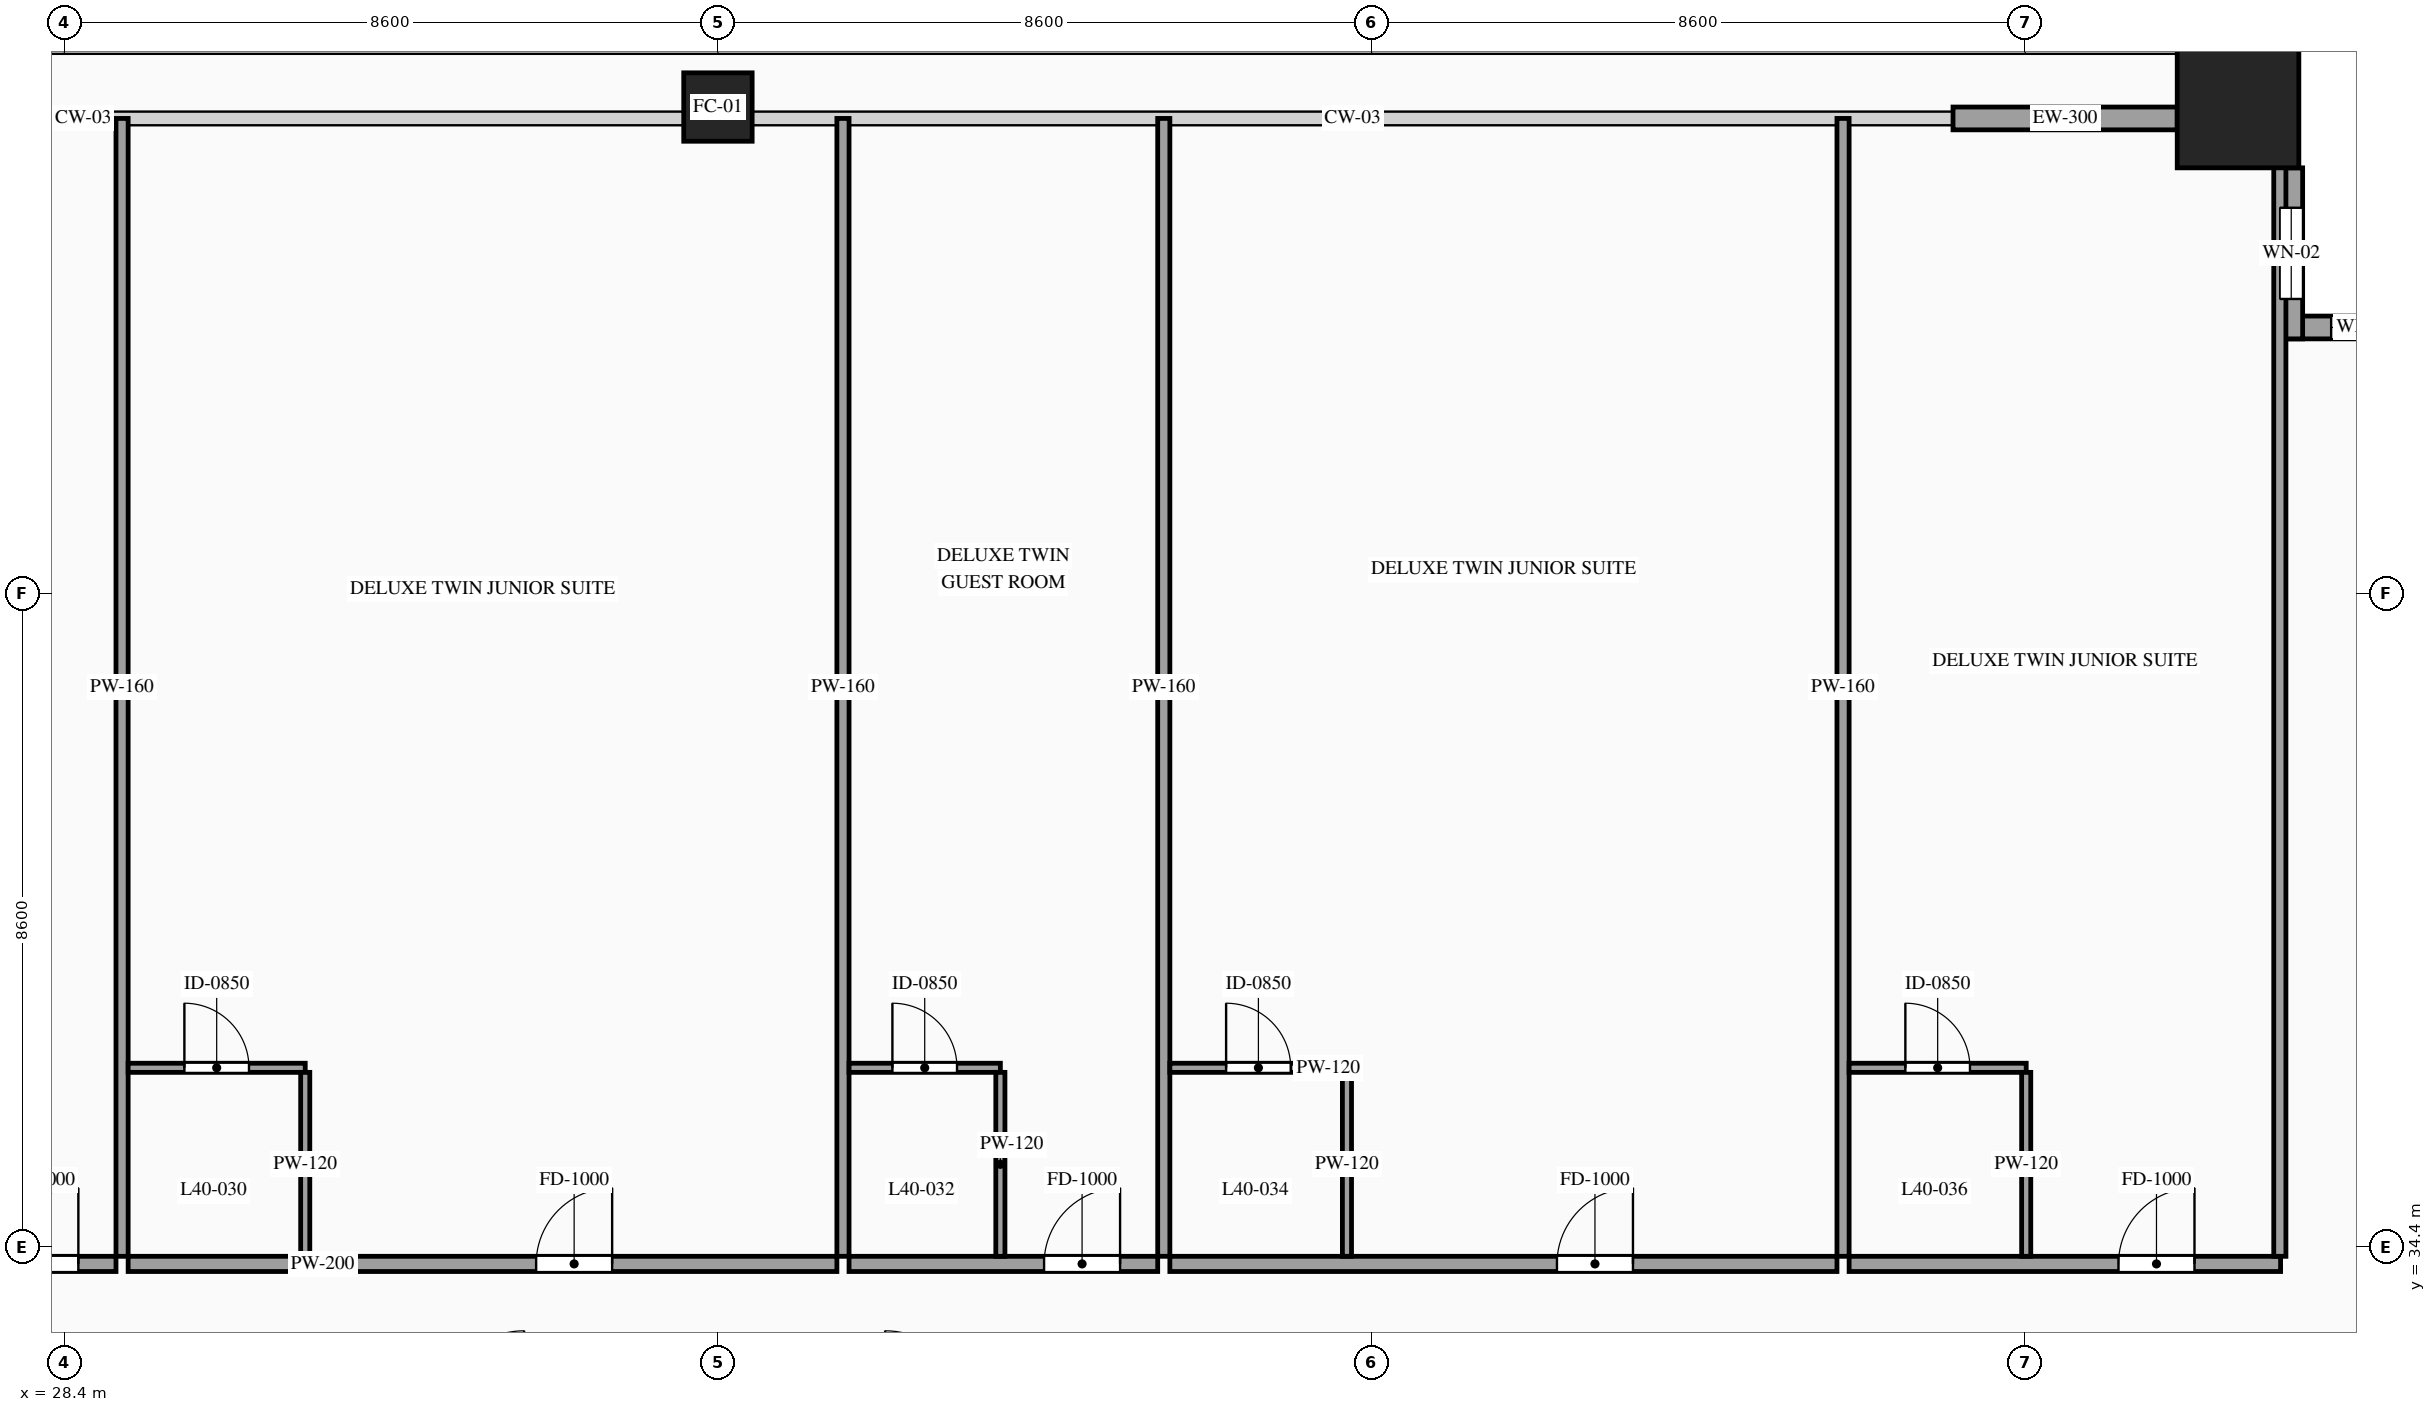
"""IFC4 building model, lengths in metres.
Left out: names, types, materials, properties, quantities, classifications, styles, units other than length and angle.
Written with IfcOpenShell. Run it as: python <this file> out.ifc"""

import sys

from ifc_helpers import new_model, si_unit, direction, frame, frame_2d, origin, origin_2d, place, context, subcontext, project, spatial, rectangle, hollow_rectangle, extrude, source, transform, mapped, element, fill, save


model = new_model("IFC4")
c1 = context("Model", 3, precision=1e-05, world=origin(), true_north=direction((0.0, 1.0)))
c2 = subcontext(c1, "Body", "Model", "MODEL_VIEW")
j1 = project(units=[si_unit("LENGTHUNIT", "METRE"), si_unit("PLANEANGLEUNIT", "RADIAN")], contexts=[c1])
p1 = place(None, origin())
s1 = spatial("IfcSite", under=j1, at=p1, CompositionType="ELEMENT")
p2 = place(p1, origin())
s2 = spatial("IfcBuilding", under=s1, at=p2, CompositionType="ELEMENT")
p3 = place(p2, frame((0.0, 0.0, 152.4)))
s3 = spatial("IfcBuildingStorey", under=s2, at=p3, CompositionType="ELEMENT", Elevation=152.4)
m1 = source(origin(), c2, "Body", "SweptSolid", [
    extrude(hollow_rectangle(XDim=0.9, YDim=0.9, WallThickness=0.042, at=origin_2d()), origin(), (0.0, 0.0, 1.0), 3.6),
])
p4 = place(p3, frame((37.0, 49.4, 0.0), z_axis=(0.0, 0.0, 1.0), x_axis=(1.0, 0.0, 0.0)))
e1 = element("IfcColumn", 1, at=p4, inside=s3, PredefinedType="COLUMN", context=c2, shape_type="MappedRepresentation", body=[
    mapped(m1, transform((0.0, 0.0, 0.0), scale=1.0)),
])
m2 = source(origin(), c2, "Body", "SweptSolid", [
    extrude(hollow_rectangle(XDim=1.6, YDim=1.6, WallThickness=0.07, at=origin_2d()), origin(), (0.0, 0.0, 1.0), 3.6),
])
p5 = place(p3, frame((57.0, 49.4, 0.0), z_axis=(0.0, 0.0, 1.0), x_axis=(1.0, 0.0, 0.0)))
e2 = element("IfcColumn", 2, at=p5, inside=s3, PredefinedType="COLUMN", context=c2, shape_type="MappedRepresentation", body=[
    mapped(m2, transform((0.0, 0.0, 0.0), scale=1.0)),
])
p6 = place(p3, frame((59.8, 46.5, 0.0), z_axis=(0.0, 0.0, 1.0), x_axis=(-1.0, 0.0, 0.0)))
e3 = element("IfcWall", 3, at=p6, inside=s3, PredefinedType="SOLIDWALL", context=c2, shape_type="SweptSolid", body=[
    extrude(rectangle(XDim=2.25, YDim=0.3, at=frame_2d((1.125, 0.0))), origin(), (0.0, 0.0, 1.0), 3.38),
])
p7 = place(p6, frame((0.675, 0.0, 0.85)))
e4 = element("IfcOpeningElement", 4, at=p7, cuts=e3, PredefinedType="OPENING", context=c2, shape_type="SweptSolid", body=[
    extrude(rectangle(XDim=0.9, YDim=1.5, at=frame_2d((0.45, 0.75))), frame((0.0, 0.165, 0.0), z_axis=(0.0, -1.0, 0.0), x_axis=(1.0, 0.0, 0.0)), (0.0, 0.0, 1.0), 0.33),
])
p8 = place(p3, frame((57.7, 46.35, 0.0), z_axis=(0.0, 0.0, 1.0), x_axis=(0.0, 1.0, 0.0)))
e5 = element("IfcWall", 5, at=p8, inside=s3, PredefinedType="SOLIDWALL", context=c2, shape_type="SweptSolid", body=[
    extrude(rectangle(XDim=2.25, YDim=0.3, at=frame_2d((1.125, 0.0))), origin(), (0.0, 0.0, 1.0), 3.38),
])
p9 = place(p8, frame((0.525, 0.0, 0.85)))
e6 = element("IfcOpeningElement", 6, at=p9, cuts=e5, PredefinedType="OPENING", context=c2, shape_type="SweptSolid", body=[
    extrude(rectangle(XDim=1.2, YDim=2.1, at=frame_2d((0.6, 1.05))), frame((0.0, 0.165, 0.0), z_axis=(0.0, -1.0, 0.0), x_axis=(1.0, 0.0, 0.0)), (0.0, 0.0, 1.0), 0.33),
])
m3 = source(origin(), c2, "Body", "SweptSolid", [
    extrude(rectangle(XDim=2.95, YDim=0.3, at=frame_2d((1.475, 0.0))), origin(), (0.0, 0.0, 1.0), 2.775),
])
p10 = place(p3, frame((53.25, 49.25, 0.0), z_axis=(0.0, 0.0, 1.0), x_axis=(1.0, 0.0, 0.0)))
e7 = element("IfcWall", 7, at=p10, inside=s3, PredefinedType="SOLIDWALL", context=c2, shape_type="MappedRepresentation", body=[
    mapped(m3, transform((0.0, 0.0, 0.0), scale=1.0)),
])
p11 = place(p3, frame((25.018, 34.18, 0.0), z_axis=(0.0, 0.0, 1.0), x_axis=(1.0, 0.0, 0.0)))
e8 = element("IfcWall", 8, at=p11, inside=s3, PredefinedType="PARTITIONING", context=c2, shape_type="SweptSolid", body=[
    extrude(rectangle(XDim=4.062, YDim=0.2, at=frame_2d((2.031, 0.0))), origin(), (0.0, 0.0, 1.0), 3.38),
])
p12 = place(p11, frame((2.567, 0.0, 0.0)))
e9 = element("IfcOpeningElement", 9, at=p12, cuts=e8, PredefinedType="OPENING", context=c2, shape_type="SweptSolid", body=[
    extrude(rectangle(XDim=1.0, YDim=2.2, at=frame_2d((0.5, 1.1))), frame((0.0, 0.115, 0.0), z_axis=(0.0, -1.0, 0.0), x_axis=(1.0, 0.0, 0.0)), (0.0, 0.0, 1.0), 0.23),
])
m4 = source(origin(), c2, "Body", "SweptSolid", [
    extrude(rectangle(XDim=14.97, YDim=0.16, at=frame_2d((7.485, 0.0))), origin(), (0.0, 0.0, 1.0), 3.38),
])
p13 = place(p3, frame((29.16, 34.28, 0.0), z_axis=(0.0, 0.0, 1.0), x_axis=(0.0, 1.0, 0.0)))
e10 = element("IfcWall", 10, at=p13, inside=s3, PredefinedType="PARTITIONING", context=c2, shape_type="MappedRepresentation", body=[
    mapped(m4, transform((0.0, 0.0, 0.0), scale=1.0)),
])
p14 = place(p3, frame((29.24, 34.18, 0.0), z_axis=(0.0, 0.0, 1.0), x_axis=(1.0, 0.0, 0.0)))
e11 = element("IfcWall", 11, at=p14, inside=s3, PredefinedType="PARTITIONING", context=c2, shape_type="SweptSolid", body=[
    extrude(rectangle(XDim=9.325, YDim=0.2, at=frame_2d((4.663, 0.0))), origin(), (0.0, 0.0, 1.0), 3.38),
])
p15 = place(p14, frame((5.368, 0.0, 0.0)))
e12 = element("IfcOpeningElement", 12, at=p15, cuts=e11, PredefinedType="OPENING", context=c2, shape_type="SweptSolid", body=[
    extrude(rectangle(XDim=1.0, YDim=2.2, at=frame_2d((0.5, 1.1))), frame((0.0, 0.115, 0.0), z_axis=(0.0, -1.0, 0.0), x_axis=(1.0, 0.0, 0.0)), (0.0, 0.0, 1.0), 0.23),
])
p16 = place(p3, frame((38.645, 34.28, 0.0), z_axis=(0.0, 0.0, 1.0), x_axis=(0.0, 1.0, 0.0)))
e13 = element("IfcWall", 13, at=p16, inside=s3, PredefinedType="PARTITIONING", context=c2, shape_type="MappedRepresentation", body=[
    mapped(m4, transform((0.0, 0.0, 0.0), scale=1.0)),
])
p17 = place(p3, frame((29.24, 36.76, 0.0), z_axis=(0.0, 0.0, 1.0), x_axis=(1.0, 0.0, 0.0)))
e14 = element("IfcWall", 14, at=p17, inside=s3, PredefinedType="PARTITIONING", context=c2, shape_type="SweptSolid", body=[
    extrude(rectangle(XDim=2.33, YDim=0.12, at=frame_2d((1.165, 0.0))), origin(), (0.0, 0.0, 1.0), 3.38),
])
p18 = place(p17, frame((0.74, 0.0, 0.0)))
e15 = element("IfcOpeningElement", 15, at=p18, cuts=e14, PredefinedType="OPENING", context=c2, shape_type="SweptSolid", body=[
    extrude(rectangle(XDim=0.85, YDim=2.1, at=frame_2d((0.425, 1.05))), frame((0.0, 0.075, 0.0), z_axis=(0.0, -1.0, 0.0), x_axis=(1.0, 0.0, 0.0)), (0.0, 0.0, 1.0), 0.15),
])
m5 = source(origin(), c2, "Body", "SweptSolid", [
    extrude(rectangle(XDim=2.42, YDim=0.12, at=frame_2d((1.21, 0.0))), origin(), (0.0, 0.0, 1.0), 3.38),
])
p19 = place(p3, frame((31.57, 34.28, 0.0), z_axis=(0.0, 0.0, 1.0), x_axis=(0.0, 1.0, 0.0)))
e16 = element("IfcWall", 16, at=p19, inside=s3, PredefinedType="PARTITIONING", context=c2, shape_type="MappedRepresentation", body=[
    mapped(m5, transform((0.0, 0.0, 0.0), scale=1.0)),
])
p20 = place(p3, frame((38.725, 34.18, 0.0), z_axis=(0.0, 0.0, 1.0), x_axis=(1.0, 0.0, 0.0)))
e17 = element("IfcWall", 17, at=p20, inside=s3, PredefinedType="PARTITIONING", context=c2, shape_type="SweptSolid", body=[
    extrude(rectangle(XDim=4.061, YDim=0.2, at=frame_2d((2.03, 0.0))), origin(), (0.0, 0.0, 1.0), 3.38),
])
p21 = place(p20, frame((2.566, 0.0, 0.0)))
e18 = element("IfcOpeningElement", 18, at=p21, cuts=e17, PredefinedType="OPENING", context=c2, shape_type="SweptSolid", body=[
    extrude(rectangle(XDim=1.0, YDim=2.2, at=frame_2d((0.5, 1.1))), frame((0.0, 0.115, 0.0), z_axis=(0.0, -1.0, 0.0), x_axis=(1.0, 0.0, 0.0)), (0.0, 0.0, 1.0), 0.23),
])
p22 = place(p3, frame((42.866, 34.28, 0.0), z_axis=(0.0, 0.0, 1.0), x_axis=(0.0, 1.0, 0.0)))
e19 = element("IfcWall", 19, at=p22, inside=s3, PredefinedType="PARTITIONING", context=c2, shape_type="MappedRepresentation", body=[
    mapped(m4, transform((0.0, 0.0, 0.0), scale=1.0)),
])
p23 = place(p3, frame((38.725, 36.76, 0.0), z_axis=(0.0, 0.0, 1.0), x_axis=(1.0, 0.0, 0.0)))
e20 = element("IfcWall", 20, at=p23, inside=s3, PredefinedType="PARTITIONING", context=c2, shape_type="SweptSolid", body=[
    extrude(rectangle(XDim=1.991, YDim=0.12, at=frame_2d((0.996, 0.0))), origin(), (0.0, 0.0, 1.0), 3.38),
])
p24 = place(p23, frame((0.571, 0.0, 0.0)))
e21 = element("IfcOpeningElement", 21, at=p24, cuts=e20, PredefinedType="OPENING", context=c2, shape_type="SweptSolid", body=[
    extrude(rectangle(XDim=0.85, YDim=2.1, at=frame_2d((0.425, 1.05))), frame((0.0, 0.075, 0.0), z_axis=(0.0, -1.0, 0.0), x_axis=(1.0, 0.0, 0.0)), (0.0, 0.0, 1.0), 0.15),
])
p25 = place(p3, frame((40.716, 34.28, 0.0), z_axis=(0.0, 0.0, 1.0), x_axis=(0.0, 1.0, 0.0)))
e22 = element("IfcWall", 22, at=p25, inside=s3, PredefinedType="PARTITIONING", context=c2, shape_type="MappedRepresentation", body=[
    mapped(m5, transform((0.0, 0.0, 0.0), scale=1.0)),
])
p26 = place(p3, frame((42.946, 34.18, 0.0), z_axis=(0.0, 0.0, 1.0), x_axis=(1.0, 0.0, 0.0)))
e23 = element("IfcWall", 23, at=p26, inside=s3, PredefinedType="PARTITIONING", context=c2, shape_type="SweptSolid", body=[
    extrude(rectangle(XDim=8.777, YDim=0.2, at=frame_2d((4.388, 0.0))), origin(), (0.0, 0.0, 1.0), 3.38),
])
p27 = place(p26, frame((5.093, 0.0, 0.0)))
e24 = element("IfcOpeningElement", 24, at=p27, cuts=e23, PredefinedType="OPENING", context=c2, shape_type="SweptSolid", body=[
    extrude(rectangle(XDim=1.0, YDim=2.2, at=frame_2d((0.5, 1.1))), frame((0.0, 0.115, 0.0), z_axis=(0.0, -1.0, 0.0), x_axis=(1.0, 0.0, 0.0)), (0.0, 0.0, 1.0), 0.23),
])
p28 = place(p3, frame((51.803, 34.28, 0.0), z_axis=(0.0, 0.0, 1.0), x_axis=(0.0, 1.0, 0.0)))
e25 = element("IfcWall", 25, at=p28, inside=s3, PredefinedType="PARTITIONING", context=c2, shape_type="MappedRepresentation", body=[
    mapped(m4, transform((0.0, 0.0, 0.0), scale=1.0)),
])
p29 = place(p3, frame((42.946, 36.76, 0.0), z_axis=(0.0, 0.0, 1.0), x_axis=(1.0, 0.0, 0.0)))
e26 = element("IfcWall", 26, at=p29, inside=s3, PredefinedType="PARTITIONING", context=c2, shape_type="SweptSolid", body=[
    extrude(rectangle(XDim=2.33, YDim=0.12, at=frame_2d((1.165, 0.0))), origin(), (0.0, 0.0, 1.0), 3.38),
])
p30 = place(p29, frame((0.74, 0.0, 0.0)))
e27 = element("IfcOpeningElement", 27, at=p30, cuts=e26, PredefinedType="OPENING", context=c2, shape_type="SweptSolid", body=[
    extrude(rectangle(XDim=0.85, YDim=2.1, at=frame_2d((0.425, 1.05))), frame((0.0, 0.075, 0.0), z_axis=(0.0, -1.0, 0.0), x_axis=(1.0, 0.0, 0.0)), (0.0, 0.0, 1.0), 0.15),
])
p31 = place(p3, frame((45.276, 34.28, 0.0), z_axis=(0.0, 0.0, 1.0), x_axis=(0.0, 1.0, 0.0)))
e28 = element("IfcWall", 28, at=p31, inside=s3, PredefinedType="PARTITIONING", context=c2, shape_type="MappedRepresentation", body=[
    mapped(m5, transform((0.0, 0.0, 0.0), scale=1.0)),
])
p32 = place(p3, frame((51.883, 34.18, 0.0), z_axis=(0.0, 0.0, 1.0), x_axis=(1.0, 0.0, 0.0)))
e29 = element("IfcWall", 29, at=p32, inside=s3, PredefinedType="PARTITIONING", context=c2, shape_type="SweptSolid", body=[
    extrude(rectangle(XDim=5.677, YDim=0.2, at=frame_2d((2.838, 0.0))), origin(), (0.0, 0.0, 1.0), 3.38),
])
p33 = place(p32, frame((3.544, 0.0, 0.0)))
e30 = element("IfcOpeningElement", 30, at=p33, cuts=e29, PredefinedType="OPENING", context=c2, shape_type="SweptSolid", body=[
    extrude(rectangle(XDim=1.0, YDim=2.2, at=frame_2d((0.5, 1.1))), frame((0.0, 0.115, 0.0), z_axis=(0.0, -1.0, 0.0), x_axis=(1.0, 0.0, 0.0)), (0.0, 0.0, 1.0), 0.23),
])
m6 = source(origin(), c2, "Body", "SweptSolid", [
    extrude(rectangle(XDim=14.82, YDim=0.16, at=frame_2d((7.41, 0.0))), origin(), (0.0, 0.0, 1.0), 3.38),
])
p34 = place(p3, frame((57.55, 34.28, 0.0), z_axis=(0.0, 0.0, 1.0), x_axis=(0.0, 1.0, 0.0)))
e31 = element("IfcWall", 31, at=p34, inside=s3, PredefinedType="PARTITIONING", context=c2, shape_type="MappedRepresentation", body=[
    mapped(m6, transform((0.0, 0.0, 0.0), scale=1.0)),
])
p35 = place(p3, frame((51.883, 36.76, 0.0), z_axis=(0.0, 0.0, 1.0), x_axis=(1.0, 0.0, 0.0)))
e32 = element("IfcWall", 32, at=p35, inside=s3, PredefinedType="PARTITIONING", context=c2, shape_type="SweptSolid", body=[
    extrude(rectangle(XDim=2.33, YDim=0.12, at=frame_2d((1.165, 0.0))), origin(), (0.0, 0.0, 1.0), 3.38),
])
p36 = place(p35, frame((0.74, 0.0, 0.0)))
e33 = element("IfcOpeningElement", 33, at=p36, cuts=e32, PredefinedType="OPENING", context=c2, shape_type="SweptSolid", body=[
    extrude(rectangle(XDim=0.85, YDim=2.1, at=frame_2d((0.425, 1.05))), frame((0.0, 0.075, 0.0), z_axis=(0.0, -1.0, 0.0), x_axis=(1.0, 0.0, 0.0)), (0.0, 0.0, 1.0), 0.15),
])
p37 = place(p3, frame((54.213, 34.28, 0.0), z_axis=(0.0, 0.0, 1.0), x_axis=(0.0, 1.0, 0.0)))
e34 = element("IfcWall", 34, at=p37, inside=s3, PredefinedType="PARTITIONING", context=c2, shape_type="MappedRepresentation", body=[
    mapped(m5, transform((0.0, 0.0, 0.0), scale=1.0)),
])
m7 = source(origin(), c2, "Body", "SweptSolid", [
    extrude(rectangle(XDim=0.9, YDim=1.5, at=frame_2d((0.45, 0.75))), frame((0.0, 0.03, 0.0), z_axis=(0.0, -1.0, 0.0), x_axis=(1.0, 0.0, 0.0)), (0.0, 0.0, 1.0), 0.06),
])
p38 = place(p7, origin())
e35 = element("IfcWindow", 35, at=p38, inside=s3, PartitioningType="SINGLE_PANEL", PredefinedType="WINDOW", context=c2, shape_type="MappedRepresentation", body=[
    mapped(m7, transform((0.0, 0.0, 0.0), scale=1.0)),
])
fill(e4, e35)
m8 = source(origin(), c2, "Body", "SweptSolid", [
    extrude(rectangle(XDim=1.2, YDim=2.1, at=frame_2d((0.6, 1.05))), frame((0.0, 0.03, 0.0), z_axis=(0.0, -1.0, 0.0), x_axis=(1.0, 0.0, 0.0)), (0.0, 0.0, 1.0), 0.06),
])
p39 = place(p9, origin())
e36 = element("IfcWindow", 36, at=p39, inside=s3, PartitioningType="SINGLE_PANEL", PredefinedType="WINDOW", context=c2, shape_type="MappedRepresentation", body=[
    mapped(m8, transform((0.0, 0.0, 0.0), scale=1.0)),
])
fill(e6, e36)
m9 = source(origin(), c2, "Body", "SweptSolid", [
    extrude(rectangle(XDim=1.0, YDim=2.2, at=frame_2d((0.5, 1.1))), frame((0.0, 0.025, 0.0), z_axis=(0.0, -1.0, 0.0), x_axis=(1.0, 0.0, 0.0)), (0.0, 0.0, 1.0), 0.05),
])
p40 = place(p12, origin())
e37 = element("IfcDoor", 37, at=p40, inside=s3, OperationType="SINGLE_SWING_RIGHT", PredefinedType="DOOR", context=c2, shape_type="MappedRepresentation", body=[
    mapped(m9, transform((0.0, 0.0, 0.0), scale=1.0)),
])
fill(e9, e37)
p41 = place(p15, origin())
e38 = element("IfcDoor", 38, at=p41, inside=s3, OperationType="SINGLE_SWING_RIGHT", PredefinedType="DOOR", context=c2, shape_type="MappedRepresentation", body=[
    mapped(m9, transform((0.0, 0.0, 0.0), scale=1.0)),
])
fill(e12, e38)
m10 = source(origin(), c2, "Body", "SweptSolid", [
    extrude(rectangle(XDim=0.85, YDim=2.1, at=frame_2d((0.425, 1.05))), frame((0.0, 0.025, 0.0), z_axis=(0.0, -1.0, 0.0), x_axis=(1.0, 0.0, 0.0)), (0.0, 0.0, 1.0), 0.05),
])
p42 = place(p18, origin())
e39 = element("IfcDoor", 39, at=p42, inside=s3, OperationType="SINGLE_SWING_LEFT", PredefinedType="DOOR", context=c2, shape_type="MappedRepresentation", body=[
    mapped(m10, transform((0.0, 0.0, 0.0), scale=1.0)),
])
fill(e15, e39)
p43 = place(p21, origin())
e40 = element("IfcDoor", 40, at=p43, inside=s3, OperationType="SINGLE_SWING_RIGHT", PredefinedType="DOOR", context=c2, shape_type="MappedRepresentation", body=[
    mapped(m9, transform((0.0, 0.0, 0.0), scale=1.0)),
])
fill(e18, e40)
p44 = place(p24, origin())
e41 = element("IfcDoor", 41, at=p44, inside=s3, OperationType="SINGLE_SWING_LEFT", PredefinedType="DOOR", context=c2, shape_type="MappedRepresentation", body=[
    mapped(m10, transform((0.0, 0.0, 0.0), scale=1.0)),
])
fill(e21, e41)
p45 = place(p27, origin())
e42 = element("IfcDoor", 42, at=p45, inside=s3, OperationType="SINGLE_SWING_RIGHT", PredefinedType="DOOR", context=c2, shape_type="MappedRepresentation", body=[
    mapped(m9, transform((0.0, 0.0, 0.0), scale=1.0)),
])
fill(e24, e42)
p46 = place(p30, origin())
e43 = element("IfcDoor", 43, at=p46, inside=s3, OperationType="SINGLE_SWING_LEFT", PredefinedType="DOOR", context=c2, shape_type="MappedRepresentation", body=[
    mapped(m10, transform((0.0, 0.0, 0.0), scale=1.0)),
])
fill(e27, e43)
p47 = place(p33, origin())
e44 = element("IfcDoor", 44, at=p47, inside=s3, OperationType="SINGLE_SWING_RIGHT", PredefinedType="DOOR", context=c2, shape_type="MappedRepresentation", body=[
    mapped(m9, transform((0.0, 0.0, 0.0), scale=1.0)),
])
fill(e30, e44)
p48 = place(p36, origin())
e45 = element("IfcDoor", 45, at=p48, inside=s3, OperationType="SINGLE_SWING_LEFT", PredefinedType="DOOR", context=c2, shape_type="MappedRepresentation", body=[
    mapped(m10, transform((0.0, 0.0, 0.0), scale=1.0)),
])
fill(e33, e45)
save(model, sys.argv[1])
